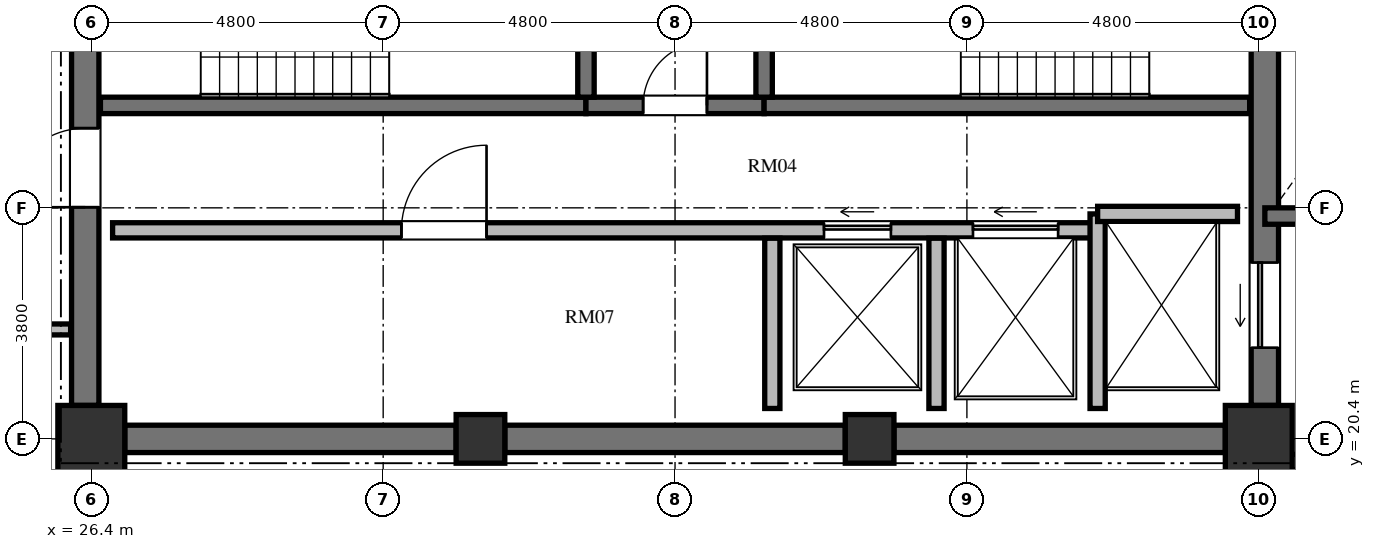
"""IFC4 building model, lengths in metres.
Left out: names, types, materials, properties, quantities, classifications, styles, units other than length and angle.
Written with IfcOpenShell. Run it as: python <this file> out.ifc"""

import sys

from ifc_helpers import new_model, si_unit, direction, frame, frame_2d, origin, origin_2d, place, context, subcontext, project, spatial, rectangle, extrude, element, fill, save


model = new_model("IFC4")
c1 = context("Model", 3, precision=1e-05, world=origin(), true_north=direction((0.0, 1.0)))
c2 = subcontext(c1, "Body", "Model", "MODEL_VIEW")
j1 = project(units=[si_unit("LENGTHUNIT", "METRE"), si_unit("PLANEANGLEUNIT", "RADIAN")], contexts=[c1])
p1 = place(None, origin())
s1 = spatial("IfcSite", under=j1, at=p1, CompositionType="ELEMENT")
p2 = place(p1, origin())
s2 = spatial("IfcBuilding", under=s1, at=p2, CompositionType="ELEMENT")
p3 = place(p2, frame((0.0, 0.0, 276.912)))
s3 = spatial("IfcBuildingStorey", under=s2, at=p3, CompositionType="ELEMENT", Elevation=276.912)
p4 = place(p3, frame((26.4, 20.4, 0.0), z_axis=(0.0, 0.0, 1.0), x_axis=(1.0, 0.0, 0.0)))
e1 = element("IfcColumn", 1, at=p4, inside=s3, PredefinedType="COLUMN", context=c2, shape_type="SweptSolid", body=[
    extrude(rectangle(XDim=1.1, YDim=1.1, at=origin_2d()), origin(), (0.0, 0.0, 1.0), 3.648),
])
for number, where, z_axis, x_axis in (
    (2, (32.8, 20.4, 0.0), (0.0, 0.0, 1.0), (1.0, 0.0, 0.0)),
    (3, (39.2, 20.4, 0.0), (0.0, 0.0, 1.0), (1.0, 0.0, 0.0)),
):
    element("IfcColumn", number, at=place(p3, frame(where, z_axis=z_axis, x_axis=x_axis)), inside=s3, PredefinedType="COLUMN", context=c2, shape_type="SweptSolid", body=[
        extrude(rectangle(XDim=0.8, YDim=0.8, at=origin_2d()), origin(), (0.0, 0.0, 1.0), 3.648),
    ])
p5 = place(p3, frame((45.6, 20.4, 0.0), z_axis=(0.0, 0.0, 1.0), x_axis=(1.0, 0.0, 0.0)))
e4 = element("IfcColumn", 4, at=p5, inside=s3, PredefinedType="COLUMN", context=c2, shape_type="SweptSolid", body=[
    extrude(rectangle(XDim=1.1, YDim=1.1, at=origin_2d()), origin(), (0.0, 0.0, 1.0), 3.648),
])
p6 = place(p3, frame((26.3, 20.95, 0.0), z_axis=(0.0, 0.0, 1.0), x_axis=(0.0, 1.0, 0.0)))
e5 = element("IfcWall", 5, at=p6, inside=s3, PredefinedType="SHEAR", context=c2, shape_type="SweptSolid", body=[
    extrude(rectangle(XDim=14.1, YDim=0.45, at=frame_2d((7.05, 0.0))), origin(), (0.0, 0.0, 1.0), 3.648),
])
p7 = place(p6, frame((6.5, 0.0, 0.0)))
e6 = element("IfcOpeningElement", 6, at=p7, cuts=e5, PredefinedType="OPENING", context=c2, shape_type="SweptSolid", body=[
    extrude(rectangle(XDim=1.2, YDim=2.15, at=frame_2d((0.6, 1.075))), frame((0.0, 0.235, 0.0), z_axis=(0.0, -1.0, 0.0), x_axis=(1.0, 0.0, 0.0)), (0.0, 0.0, 1.0), 0.47),
])
p8 = place(p6, frame((9.6, 0.0, 0.0)))
e7 = element("IfcOpeningElement", 7, at=p8, cuts=e5, PredefinedType="OPENING", context=c2, shape_type="SweptSolid", body=[
    extrude(rectangle(XDim=1.3, YDim=2.2, at=frame_2d((0.65, 1.1))), frame((0.0, 0.235, 0.0), z_axis=(0.0, -1.0, 0.0), x_axis=(1.0, 0.0, 0.0)), (0.0, 0.0, 1.0), 0.47),
])
p9 = place(p6, frame((3.26, 0.0, 0.0)))
e8 = element("IfcOpeningElement", 8, at=p9, cuts=e5, PredefinedType="OPENING", context=c2, shape_type="SweptSolid", body=[
    extrude(rectangle(XDim=1.3, YDim=2.2, at=frame_2d((0.65, 1.1))), frame((0.0, 0.235, 0.0), z_axis=(0.0, -1.0, 0.0), x_axis=(1.0, 0.0, 0.0)), (0.0, 0.0, 1.0), 0.47),
])
p10 = place(p3, frame((45.7, 20.95, 0.0), z_axis=(0.0, 0.0, 1.0), x_axis=(0.0, 1.0, 0.0)))
e9 = element("IfcWall", 9, at=p10, inside=s3, PredefinedType="SHEAR", context=c2, shape_type="SweptSolid", body=[
    extrude(rectangle(XDim=14.1, YDim=0.45, at=frame_2d((7.05, 0.0))), origin(), (0.0, 0.0, 1.0), 3.648),
])
p11 = place(p10, frame((11.75, 0.0, 0.0)))
e10 = element("IfcOpeningElement", 10, at=p11, cuts=e9, PredefinedType="OPENING", context=c2, shape_type="SweptSolid", body=[
    extrude(rectangle(XDim=1.4, YDim=2.3, at=frame_2d((0.7, 1.15))), frame((0.0, 0.235, 0.0), z_axis=(0.0, -1.0, 0.0), x_axis=(1.0, 0.0, 0.0)), (0.0, 0.0, 1.0), 0.47),
])
p12 = place(p10, frame((0.95, 0.0, 0.0)))
e11 = element("IfcOpeningElement", 11, at=p12, cuts=e9, PredefinedType="OPENING", context=c2, shape_type="SweptSolid", body=[
    extrude(rectangle(XDim=1.4, YDim=2.3, at=frame_2d((0.7, 1.15))), frame((0.0, 0.235, 0.0), z_axis=(0.0, -1.0, 0.0), x_axis=(1.0, 0.0, 0.0)), (0.0, 0.0, 1.0), 0.47),
])
p13 = place(p3, frame((26.95, 20.4, 0.0), z_axis=(0.0, 0.0, 1.0), x_axis=(1.0, 0.0, 0.0)))
e12 = element("IfcWall", 12, at=p13, inside=s3, PredefinedType="SHEAR", context=c2, shape_type="SweptSolid", body=[
    extrude(rectangle(XDim=5.45, YDim=0.45, at=frame_2d((2.725, 0.0))), origin(), (0.0, 0.0, 1.0), 3.648),
])
p14 = place(p3, frame((33.2, 20.4, 0.0), z_axis=(0.0, 0.0, 1.0), x_axis=(1.0, 0.0, 0.0)))
e13 = element("IfcWall", 13, at=p14, inside=s3, PredefinedType="SHEAR", context=c2, shape_type="SweptSolid", body=[
    extrude(rectangle(XDim=5.6, YDim=0.45, at=frame_2d((2.8, 0.0))), origin(), (0.0, 0.0, 1.0), 3.648),
])
p15 = place(p3, frame((39.6, 20.4, 0.0), z_axis=(0.0, 0.0, 1.0), x_axis=(1.0, 0.0, 0.0)))
e14 = element("IfcWall", 14, at=p15, inside=s3, PredefinedType="SHEAR", context=c2, shape_type="SweptSolid", body=[
    extrude(rectangle(XDim=5.45, YDim=0.45, at=frame_2d((2.725, 0.0))), origin(), (0.0, 0.0, 1.0), 3.648),
])
p16 = place(p3, frame((26.55, 25.885, 0.0), z_axis=(0.0, 0.0, 1.0), x_axis=(1.0, 0.0, 0.0)))
e15 = element("IfcWall", 15, at=p16, inside=s3, PredefinedType="SHEAR", context=c2, shape_type="SweptSolid", body=[
    extrude(rectangle(XDim=7.985, YDim=0.27, at=frame_2d((3.992, 0.0))), origin(), (0.0, 0.0, 1.0), 3.648),
])
p17 = place(p3, frame((34.535, 25.885, 0.0), z_axis=(0.0, 0.0, 1.0), x_axis=(1.0, 0.0, 0.0)))
e16 = element("IfcWall", 16, at=p17, inside=s3, PredefinedType="SHEAR", context=c2, shape_type="SweptSolid", body=[
    extrude(rectangle(XDim=2.93, YDim=0.27, at=frame_2d((1.465, 0.0))), origin(), (0.0, 0.0, 1.0), 3.648),
])
p18 = place(p17, frame((0.94, 0.0, 0.0)))
e17 = element("IfcOpeningElement", 17, at=p18, cuts=e16, PredefinedType="OPENING", context=c2, shape_type="SweptSolid", body=[
    extrude(rectangle(XDim=1.05, YDim=2.15, at=frame_2d((0.525, 1.075))), frame((0.0, 0.145, 0.0), z_axis=(0.0, -1.0, 0.0), x_axis=(1.0, 0.0, 0.0)), (0.0, 0.0, 1.0), 0.29),
])
p19 = place(p3, frame((37.465, 25.885, 0.0), z_axis=(0.0, 0.0, 1.0), x_axis=(1.0, 0.0, 0.0)))
e18 = element("IfcWall", 18, at=p19, inside=s3, PredefinedType="SHEAR", context=c2, shape_type="SweptSolid", body=[
    extrude(rectangle(XDim=7.985, YDim=0.27, at=frame_2d((3.992, 0.0))), origin(), (0.0, 0.0, 1.0), 3.648),
])
for number, where, z_axis, x_axis in (
    (19, (34.535, 26.02, 0.0), (0.0, 0.0, 1.0), (0.0, 1.0, 0.0)),
    (20, (37.465, 26.02, 0.0), (0.0, 0.0, 1.0), (0.0, 1.0, 0.0)),
):
    element("IfcWall", number, at=place(p3, frame(where, z_axis=z_axis, x_axis=x_axis)), inside=s3, PredefinedType="SHEAR", context=c2, shape_type="SweptSolid", body=[
        extrude(rectangle(XDim=4.08, YDim=0.27, at=frame_2d((2.04, 0.0))), origin(), (0.0, 0.0, 1.0), 3.648),
    ])
p20 = place(p3, frame((26.75, 23.83, 0.0), z_axis=(0.0, 0.0, 1.0), x_axis=(1.0, 0.0, 0.0)))
e21 = element("IfcWall", 21, at=p20, inside=s3, PredefinedType="SOLIDWALL", context=c2, shape_type="SweptSolid", body=[
    extrude(rectangle(XDim=16.2, YDim=0.25, at=frame_2d((8.1, 0.0))), origin(), (0.0, 0.0, 1.0), 3.448),
])
p21 = place(p20, frame((4.75, 0.0, 0.0)))
e22 = element("IfcOpeningElement", 22, at=p21, cuts=e21, PredefinedType="OPENING", context=c2, shape_type="SweptSolid", body=[
    extrude(rectangle(XDim=1.4, YDim=2.2, at=frame_2d((0.7, 1.1))), frame((0.0, 0.135, 0.0), z_axis=(0.0, -1.0, 0.0), x_axis=(1.0, 0.0, 0.0)), (0.0, 0.0, 1.0), 0.27),
])
p22 = place(p20, frame((11.7, 0.0, 0.0)))
e23 = element("IfcOpeningElement", 23, at=p22, cuts=e21, PredefinedType="OPENING", context=c2, shape_type="SweptSolid", body=[
    extrude(rectangle(XDim=1.1, YDim=2.2, at=frame_2d((0.55, 1.1))), frame((0.0, 0.135, 0.0), z_axis=(0.0, -1.0, 0.0), x_axis=(1.0, 0.0, 0.0)), (0.0, 0.0, 1.0), 0.27),
])
p23 = place(p20, frame((14.15, 0.0, 0.0)))
e24 = element("IfcOpeningElement", 24, at=p23, cuts=e21, PredefinedType="OPENING", context=c2, shape_type="SweptSolid", body=[
    extrude(rectangle(XDim=1.4, YDim=2.3, at=frame_2d((0.7, 1.15))), frame((0.0, 0.135, 0.0), z_axis=(0.0, -1.0, 0.0), x_axis=(1.0, 0.0, 0.0)), (0.0, 0.0, 1.0), 0.27),
])
p24 = place(p3, frame((42.95, 20.9, 0.0), z_axis=(0.0, 0.0, 1.0), x_axis=(0.0, 1.0, 0.0)))
e25 = element("IfcWall", 25, at=p24, inside=s3, PredefinedType="SOLIDWALL", context=c2, shape_type="SweptSolid", body=[
    extrude(rectangle(XDim=3.2, YDim=0.25, at=frame_2d((1.6, 0.0))), origin(), (0.0, 0.0, 1.0), 3.448),
])
p25 = place(p3, frame((42.95, 24.1, 0.0), z_axis=(0.0, 0.0, 1.0), x_axis=(1.0, 0.0, 0.0)))
e26 = element("IfcWall", 26, at=p25, inside=s3, PredefinedType="SOLIDWALL", context=c2, shape_type="SweptSolid", body=[
    extrude(rectangle(XDim=2.3, YDim=0.25, at=frame_2d((1.15, 0.0))), origin(), (0.0, 0.0, 1.0), 3.448),
])
for number, where, z_axis, x_axis in (
    (27, (37.6, 20.9, 0.0), (0.0, 0.0, 1.0), (0.0, 1.0, 0.0)),
    (28, (40.3, 20.9, 0.0), (0.0, 0.0, 1.0), (0.0, 1.0, 0.0)),
):
    element("IfcWall", number, at=place(p3, frame(where, z_axis=z_axis, x_axis=x_axis)), inside=s3, PredefinedType="SOLIDWALL", context=c2, shape_type="SweptSolid", body=[
        extrude(rectangle(XDim=2.8, YDim=0.25, at=frame_2d((1.4, 0.0))), origin(), (0.0, 0.0, 1.0), 3.448),
    ])
p26 = place(p3, frame((45.7, 24.065, 0.0), z_axis=(0.0, 0.0, 1.0), x_axis=(1.0, 0.0, 0.0)))
e29 = element("IfcWall", 29, at=p26, inside=s3, PredefinedType="SHEAR", context=c2, shape_type="SweptSolid", body=[
    extrude(rectangle(XDim=4.715, YDim=0.27, at=frame_2d((2.357, 0.0))), origin(), (0.0, 0.0, 1.0), 3.648),
])
p27 = place(p3, frame((45.7, 20.02, 0.0), z_axis=(0.0, 0.0, 1.0), x_axis=(1.0, 0.0, 0.0)))
e30 = element("IfcWall", 30, at=p27, inside=s3, PredefinedType="SOLIDWALL", context=c2, shape_type="SweptSolid", body=[
    extrude(rectangle(XDim=4.715, YDim=0.25, at=frame_2d((2.357, 0.0))), origin(), (0.0, 0.0, 1.0), 3.448),
])
p28 = place(p3, frame((26.06, 22.2, 0.0), z_axis=(0.0, 0.0, 1.0), x_axis=(-1.0, 0.0, 0.0)))
e31 = element("IfcWall", 31, at=p28, inside=s3, PredefinedType="PARTITIONING", context=c2, shape_type="SweptSolid", body=[
    extrude(rectangle(XDim=2.35, YDim=0.18, at=frame_2d((1.175, 0.0))), origin(), (0.0, 0.0, 1.0), 3.448),
])
p29 = place(p18, origin())
e32 = element("IfcDoor", 32, at=p29, inside=s3, OperationType="SINGLE_SWING_RIGHT", PredefinedType="DOOR", context=c2, shape_type="SweptSolid", body=[
    extrude(rectangle(XDim=1.05, YDim=2.15, at=frame_2d((0.525, 1.075))), frame((0.0, 0.025, 0.0), z_axis=(0.0, -1.0, 0.0), x_axis=(1.0, 0.0, 0.0)), (0.0, 0.0, 1.0), 0.05),
])
fill(e17, e32)
p30 = place(p9, origin())
e33 = element("IfcDoor", 33, at=p30, inside=s3, OperationType="SINGLE_SWING_LEFT", PredefinedType="DOOR", context=c2, shape_type="SweptSolid", body=[
    extrude(rectangle(XDim=1.3, YDim=2.2, at=frame_2d((0.65, 1.1))), frame((0.0, 0.025, 0.0), z_axis=(0.0, -1.0, 0.0), x_axis=(1.0, 0.0, 0.0)), (0.0, 0.0, 1.0), 0.05),
])
fill(e8, e33)
p31 = place(p21, origin())
e34 = element("IfcDoor", 34, at=p31, inside=s3, OperationType="SINGLE_SWING_RIGHT", PredefinedType="DOOR", context=c2, shape_type="SweptSolid", body=[
    extrude(rectangle(XDim=1.4, YDim=2.2, at=frame_2d((0.7, 1.1))), frame((0.0, 0.025, 0.0), z_axis=(0.0, -1.0, 0.0), x_axis=(1.0, 0.0, 0.0)), (0.0, 0.0, 1.0), 0.05),
])
fill(e22, e34)
p32 = place(p22, origin())
e35 = element("IfcDoor", 35, at=p32, inside=s3, OperationType="SLIDING_TO_LEFT", PredefinedType="DOOR", context=c2, shape_type="SweptSolid", body=[
    extrude(rectangle(XDim=1.1, YDim=2.2, at=frame_2d((0.55, 1.1))), frame((0.0, 0.025, 0.0), z_axis=(0.0, -1.0, 0.0), x_axis=(1.0, 0.0, 0.0)), (0.0, 0.0, 1.0), 0.05),
])
fill(e23, e35)
p33 = place(p12, origin())
e36 = element("IfcDoor", 36, at=p33, inside=s3, OperationType="SLIDING_TO_LEFT", PredefinedType="DOOR", context=c2, shape_type="SweptSolid", body=[
    extrude(rectangle(XDim=1.4, YDim=2.3, at=frame_2d((0.7, 1.15))), frame((0.0, 0.025, 0.0), z_axis=(0.0, -1.0, 0.0), x_axis=(1.0, 0.0, 0.0)), (0.0, 0.0, 1.0), 0.05),
])
fill(e11, e36)
p34 = place(p23, origin())
e37 = element("IfcDoor", 37, at=p34, inside=s3, OperationType="SLIDING_TO_LEFT", PredefinedType="DOOR", context=c2, shape_type="SweptSolid", body=[
    extrude(rectangle(XDim=1.4, YDim=2.3, at=frame_2d((0.7, 1.15))), frame((0.0, 0.025, 0.0), z_axis=(0.0, -1.0, 0.0), x_axis=(1.0, 0.0, 0.0)), (0.0, 0.0, 1.0), 0.05),
])
fill(e24, e37)
save(model, sys.argv[1])
